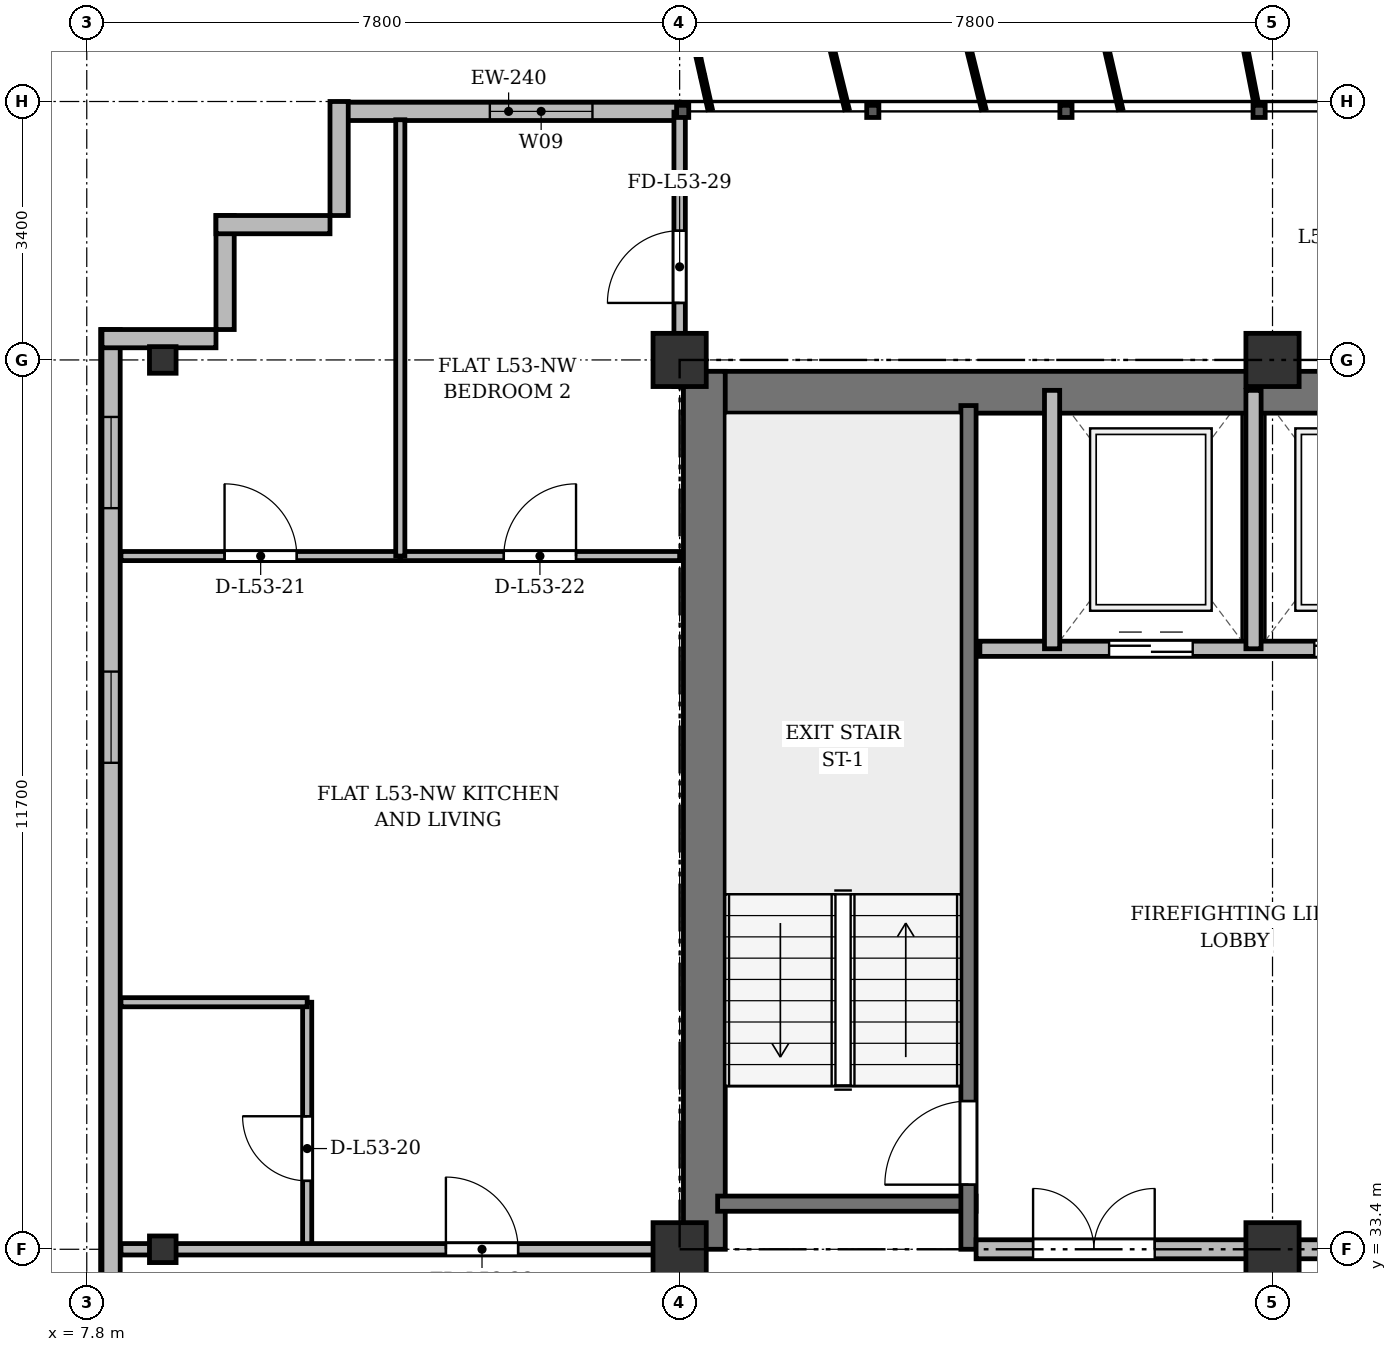
"""IFC4 building model, lengths in metres.
Left out: names, types, materials, properties, quantities, classifications, styles, units other than length and angle.
Written with IfcOpenShell. Run it as: python <this file> out.ifc"""

import sys

from ifc_helpers import new_model, si_unit, direction, frame, frame_2d, origin, origin_2d, place, context, subcontext, project, spatial, rectangle, i_section, extrude, source, transform, mapped, element, fill, save


model = new_model("IFC4")
c1 = context("Model", 3, precision=1e-05, world=origin(), true_north=direction((0.0, 1.0)))
c2 = subcontext(c1, "Body", "Model", "MODEL_VIEW")
j1 = project(units=[si_unit("LENGTHUNIT", "METRE"), si_unit("PLANEANGLEUNIT", "RADIAN")], contexts=[c1])
p1 = place(None, origin())
s1 = spatial("IfcSite", under=j1, at=p1, CompositionType="ELEMENT")
p2 = place(p1, origin())
s2 = spatial("IfcBuilding", under=s1, at=p2, CompositionType="ELEMENT")
p3 = place(p2, frame((0.0, 0.0, 204.9)))
s3 = spatial("IfcBuildingStorey", under=s2, at=p3, CompositionType="ELEMENT", Elevation=204.9)
m1 = source(origin(), c2, "Body", "SweptSolid", [
    extrude(i_section(OverallWidth=0.35, OverallDepth=0.35, WebThickness=0.018, FlangeThickness=0.028, at=origin_2d()), origin(), (0.0, 0.0, 1.0), 3.6),
])
for number, where, z_axis, x_axis in (
    (1, (8.8, 33.4, 0.0), (0.0, 0.0, 1.0), (1.0, 0.0, 0.0)),
    (2, (8.8, 45.1, 0.0), (0.0, 0.0, 1.0), (1.0, 0.0, 0.0)),
):
    element("IfcColumn", number, at=place(p3, frame(where, z_axis=z_axis, x_axis=x_axis)), inside=s3, PredefinedType="COLUMN", context=c2, shape_type="MappedRepresentation", body=[
        mapped(m1, transform((0.0, 0.0, 0.0), x_axis=(1.0, 0.0, 0.0), y_axis=(0.0, 1.0, 0.0), z_axis=(0.0, 0.0, 1.0), scale=1.0)),
    ])
m2 = source(origin(), c2, "Body", "SweptSolid", [
    extrude(rectangle(XDim=0.7, YDim=0.7, at=origin_2d()), origin(), (0.0, 0.0, 1.0), 3.6),
])
for number, where, z_axis, x_axis in (
    (3, (15.6, 33.4, 0.0), (0.0, 0.0, 1.0), (1.0, 0.0, 0.0)),
    (4, (15.6, 45.1, 0.0), (0.0, 0.0, 1.0), (1.0, 0.0, 0.0)),
    (5, (23.4, 33.4, 0.0), (0.0, 0.0, 1.0), (1.0, 0.0, 0.0)),
    (6, (23.4, 45.1, 0.0), (0.0, 0.0, 1.0), (1.0, 0.0, 0.0)),
):
    element("IfcColumn", number, at=place(p3, frame(where, z_axis=z_axis, x_axis=x_axis)), inside=s3, PredefinedType="COLUMN", context=c2, shape_type="MappedRepresentation", body=[
        mapped(m2, transform((0.0, 0.0, 0.0), x_axis=(1.0, 0.0, 0.0), y_axis=(0.0, 1.0, 0.0), z_axis=(0.0, 0.0, 1.0), scale=1.0)),
    ])
p4 = place(p3, frame((11.1, 48.37, 0.0), z_axis=(0.0, 0.0, 1.0), x_axis=(1.0, 0.0, 0.0)))
e7 = element("IfcWall", 7, at=p4, inside=s3, PredefinedType="SOLIDWALL", context=c2, shape_type="SweptSolid", body=[
    extrude(rectangle(XDim=4.5, YDim=0.24, at=frame_2d((2.25, 0.0))), origin(), (0.0, 0.0, 1.0), 3.36),
])
p5 = place(p4, frame((2.003, 0.0, 0.9)))
e8 = element("IfcOpeningElement", 8, at=p5, cuts=e7, PredefinedType="OPENING", context=c2, shape_type="SweptSolid", body=[
    extrude(rectangle(XDim=1.35, YDim=1.5, at=frame_2d((0.675, 0.75))), frame((0.0, 0.13, 0.0), z_axis=(0.0, -1.0, 0.0), x_axis=(1.0, 0.0, 0.0)), (0.0, 0.0, 1.0), 0.26),
])
p6 = place(p3, frame((8.12, 6.4, 0.0), z_axis=(0.0, 0.0, 1.0), x_axis=(0.0, 1.0, 0.0)))
e9 = element("IfcWall", 9, at=p6, inside=s3, PredefinedType="SOLIDWALL", context=c2, shape_type="SweptSolid", body=[
    extrude(rectangle(XDim=39.1, YDim=0.24, at=frame_2d((19.55, 0.0))), origin(), (0.0, 0.0, 1.0), 3.36),
])
p7 = place(p6, frame((1.45, 0.0, 0.92)))
e10 = element("IfcOpeningElement", 10, at=p7, cuts=e9, PredefinedType="OPENING", context=c2, shape_type="SweptSolid", body=[
    extrude(rectangle(XDim=1.2, YDim=1.65, at=frame_2d((0.6, 0.825))), frame((0.0, 0.13, 0.0), z_axis=(0.0, -1.0, 0.0), x_axis=(1.0, 0.0, 0.0)), (0.0, 0.0, 1.0), 0.26),
])
p8 = place(p6, frame((3.8, 0.0, 0.92)))
e11 = element("IfcOpeningElement", 11, at=p8, cuts=e9, PredefinedType="OPENING", context=c2, shape_type="SweptSolid", body=[
    extrude(rectangle(XDim=2.4, YDim=2.1, at=frame_2d((1.2, 1.05))), frame((0.0, 0.13, 0.0), z_axis=(0.0, -1.0, 0.0), x_axis=(1.0, 0.0, 0.0)), (0.0, 0.0, 1.0), 0.26),
])
p9 = place(p6, frame((8.0, 0.0, 0.92)))
e12 = element("IfcOpeningElement", 12, at=p9, cuts=e9, PredefinedType="OPENING", context=c2, shape_type="SweptSolid", body=[
    extrude(rectangle(XDim=2.4, YDim=2.1, at=frame_2d((1.2, 1.05))), frame((0.0, 0.13, 0.0), z_axis=(0.0, -1.0, 0.0), x_axis=(1.0, 0.0, 0.0)), (0.0, 0.0, 1.0), 0.26),
])
p10 = place(p6, frame((15.2, 0.0, 0.92)))
e13 = element("IfcOpeningElement", 13, at=p10, cuts=e9, PredefinedType="OPENING", context=c2, shape_type="SweptSolid", body=[
    extrude(rectangle(XDim=2.4, YDim=2.1, at=frame_2d((1.2, 1.05))), frame((0.0, 0.13, 0.0), z_axis=(0.0, -1.0, 0.0), x_axis=(1.0, 0.0, 0.0)), (0.0, 0.0, 1.0), 0.26),
])
p11 = place(p6, frame((33.4, 0.0, 0.92)))
e14 = element("IfcOpeningElement", 14, at=p11, cuts=e9, PredefinedType="OPENING", context=c2, shape_type="SweptSolid", body=[
    extrude(rectangle(XDim=1.2, YDim=1.65, at=frame_2d((0.6, 0.825))), frame((0.0, 0.13, 0.0), z_axis=(0.0, -1.0, 0.0), x_axis=(1.0, 0.0, 0.0)), (0.0, 0.0, 1.0), 0.26),
])
p12 = place(p6, frame((36.75, 0.0, 0.92)))
e15 = element("IfcOpeningElement", 15, at=p12, cuts=e9, PredefinedType="OPENING", context=c2, shape_type="SweptSolid", body=[
    extrude(rectangle(XDim=1.2, YDim=1.65, at=frame_2d((0.6, 0.825))), frame((0.0, 0.13, 0.0), z_axis=(0.0, -1.0, 0.0), x_axis=(1.0, 0.0, 0.0)), (0.0, 0.0, 1.0), 0.26),
])
for number, where, z_axis, x_axis in (
    (16, (8.0, 45.38, 0.0), (0.0, 0.0, 1.0), (1.0, 0.0, 0.0)),
    (17, (9.62, 45.5, 0.0), (0.0, 0.0, 1.0), (0.0, 1.0, 0.0)),
    (18, (9.5, 46.88, 0.0), (0.0, 0.0, 1.0), (1.0, 0.0, 0.0)),
    (19, (11.12, 47.0, 0.0), (0.0, 0.0, 1.0), (0.0, 1.0, 0.0)),
):
    element("IfcWall", number, at=place(p3, frame(where, z_axis=z_axis, x_axis=x_axis)), inside=s3, PredefinedType="SOLIDWALL", context=c2, shape_type="SweptSolid", body=[
        extrude(rectangle(XDim=1.5, YDim=0.24, at=frame_2d((0.75, 0.0))), origin(), (0.0, 0.0, 1.0), 3.36),
    ])
p13 = place(p3, frame((15.65, 44.675, 0.0), z_axis=(0.0, 0.0, 1.0), x_axis=(1.0, 0.0, 0.0)))
e20 = element("IfcWall", 20, at=p13, inside=s3, PredefinedType="SHEAR", context=c2, shape_type="SweptSolid", body=[
    extrude(rectangle(XDim=43.1, YDim=0.55, at=frame_2d((21.55, 0.0))), origin(), (0.0, 0.0, 1.0), 3.36),
])
p14 = place(p3, frame((15.925, 33.4, 0.0), z_axis=(0.0, 0.0, 1.0), x_axis=(0.0, 1.0, 0.0)))
e21 = element("IfcWall", 21, at=p14, inside=s3, PredefinedType="SHEAR", context=c2, shape_type="SweptSolid", body=[
    extrude(rectangle(XDim=11.55, YDim=0.55, at=frame_2d((5.775, 0.0))), origin(), (0.0, 0.0, 1.0), 3.36),
])
p15 = place(p3, frame((16.1, 34.0, 0.0), z_axis=(0.0, 0.0, 1.0), x_axis=(1.0, 0.0, 0.0)))
e22 = element("IfcWall", 22, at=p15, inside=s3, PredefinedType="SHEAR", context=c2, shape_type="SweptSolid", body=[
    extrude(rectangle(XDim=3.4, YDim=0.2, at=frame_2d((1.7, 0.0))), origin(), (0.0, 0.0, 1.0), 3.36),
])
p16 = place(p3, frame((19.4, 33.4, 0.0), z_axis=(0.0, 0.0, 1.0), x_axis=(0.0, 1.0, 0.0)))
e23 = element("IfcWall", 23, at=p16, inside=s3, PredefinedType="SHEAR", context=c2, shape_type="SweptSolid", body=[
    extrude(rectangle(XDim=11.1, YDim=0.2, at=frame_2d((5.55, 0.0))), origin(), (0.0, 0.0, 1.0), 3.36),
])
p17 = place(p16, frame((0.85, 0.0, 0.0)))
e24 = element("IfcOpeningElement", 24, at=p17, cuts=e23, PredefinedType="OPENING", context=c2, shape_type="SweptSolid", body=[
    extrude(rectangle(XDim=1.1, YDim=2.15, at=frame_2d((0.55, 1.075))), frame((0.0, 0.11, 0.0), z_axis=(0.0, -1.0, 0.0), x_axis=(1.0, 0.0, 0.0)), (0.0, 0.0, 1.0), 0.22),
])
p18 = place(p3, frame((19.55, 41.3, 0.0), z_axis=(0.0, 0.0, 1.0), x_axis=(1.0, 0.0, 0.0)))
e25 = element("IfcWall", 25, at=p18, inside=s3, PredefinedType="SOLIDWALL", context=c2, shape_type="SweptSolid", body=[
    extrude(rectangle(XDim=6.75, YDim=0.2, at=frame_2d((3.375, 0.0))), origin(), (0.0, 0.0, 1.0), 3.36),
])
p19 = place(p18, frame((1.7, 0.0, 0.0)))
e26 = element("IfcOpeningElement", 26, at=p19, cuts=e25, PredefinedType="OPENING", context=c2, shape_type="SweptSolid", body=[
    extrude(rectangle(XDim=1.1, YDim=2.15, at=frame_2d((0.55, 1.075))), frame((0.0, 0.11, 0.0), z_axis=(0.0, -1.0, 0.0), x_axis=(1.0, 0.0, 0.0)), (0.0, 0.0, 1.0), 0.22),
])
p20 = place(p18, frame((4.4, 0.0, 0.0)))
e27 = element("IfcOpeningElement", 27, at=p20, cuts=e25, PredefinedType="OPENING", context=c2, shape_type="SweptSolid", body=[
    extrude(rectangle(XDim=1.1, YDim=2.15, at=frame_2d((0.55, 1.075))), frame((0.0, 0.11, 0.0), z_axis=(0.0, -1.0, 0.0), x_axis=(1.0, 0.0, 0.0)), (0.0, 0.0, 1.0), 0.22),
])
for number, where, z_axis, x_axis in (
    (28, (20.5, 41.3, 0.0), (0.0, 0.0, 1.0), (0.0, 1.0, 0.0)),
    (29, (23.15, 41.3, 0.0), (0.0, 0.0, 1.0), (0.0, 1.0, 0.0)),
):
    element("IfcWall", number, at=place(p3, frame(where, z_axis=z_axis, x_axis=x_axis)), inside=s3, PredefinedType="SOLIDWALL", context=c2, shape_type="SweptSolid", body=[
        extrude(rectangle(XDim=3.4, YDim=0.2, at=frame_2d((1.7, 0.0))), origin(), (0.0, 0.0, 1.0), 3.36),
    ])
p21 = place(p3, frame((19.5, 33.4, 0.0), z_axis=(0.0, 0.0, 1.0), x_axis=(1.0, 0.0, 0.0)))
e30 = element("IfcWall", 30, at=p21, inside=s3, PredefinedType="PARTITIONING", context=c2, shape_type="SweptSolid", body=[
    extrude(rectangle(XDim=6.8, YDim=0.25, at=frame_2d((3.4, 0.0))), origin(), (0.0, 0.0, 1.0), 2.91),
])
p22 = place(p21, frame((0.75, 0.0, 0.0)))
e31 = element("IfcOpeningElement", 31, at=p22, cuts=e30, PredefinedType="OPENING", context=c2, shape_type="SweptSolid", body=[
    extrude(rectangle(XDim=1.6, YDim=2.2, at=frame_2d((0.8, 1.1))), frame((0.0, 0.135, 0.0), z_axis=(0.0, -1.0, 0.0), x_axis=(1.0, 0.0, 0.0)), (0.0, 0.0, 1.0), 0.27),
])
p23 = place(p3, frame((10.7, 33.4, 0.0), z_axis=(0.0, 0.0, 1.0), x_axis=(0.0, 1.0, 0.0)))
e32 = element("IfcWall", 32, at=p23, inside=s3, PredefinedType="PARTITIONING", context=c2, shape_type="SweptSolid", body=[
    extrude(rectangle(XDim=3.25, YDim=0.12, at=frame_2d((1.625, 0.0))), origin(), (0.0, 0.0, 1.0), 2.91),
])
p24 = place(p23, frame((0.9, 0.0, 0.0)))
e33 = element("IfcOpeningElement", 33, at=p24, cuts=e32, PredefinedType="OPENING", context=c2, shape_type="SweptSolid", body=[
    extrude(rectangle(XDim=0.85, YDim=2.1, at=frame_2d((0.425, 1.05))), frame((0.0, 0.07, 0.0), z_axis=(0.0, -1.0, 0.0), x_axis=(1.0, 0.0, 0.0)), (0.0, 0.0, 1.0), 0.14),
])
p25 = place(p3, frame((8.25, 36.65, 0.0), z_axis=(0.0, 0.0, 1.0), x_axis=(1.0, 0.0, 0.0)))
e34 = element("IfcWall", 34, at=p25, inside=s3, PredefinedType="PARTITIONING", context=c2, shape_type="SweptSolid", body=[
    extrude(rectangle(XDim=2.45, YDim=0.12, at=frame_2d((1.225, 0.0))), origin(), (0.0, 0.0, 1.0), 2.86),
])
p26 = place(p3, frame((8.25, 42.52, 0.0), z_axis=(0.0, 0.0, 1.0), x_axis=(1.0, 0.0, 0.0)))
e35 = element("IfcWall", 35, at=p26, inside=s3, PredefinedType="PARTITIONING", context=c2, shape_type="SweptSolid", body=[
    extrude(rectangle(XDim=3.675, YDim=0.12, at=frame_2d((1.837, 0.0))), origin(), (0.0, 0.0, 1.0), 2.86),
])
p27 = place(p26, frame((1.363, 0.0, 0.0)))
e36 = element("IfcOpeningElement", 36, at=p27, cuts=e35, PredefinedType="OPENING", context=c2, shape_type="SweptSolid", body=[
    extrude(rectangle(XDim=0.95, YDim=2.15, at=frame_2d((0.475, 1.075))), frame((0.0, 0.07, 0.0), z_axis=(0.0, -1.0, 0.0), x_axis=(1.0, 0.0, 0.0)), (0.0, 0.0, 1.0), 0.14),
])
p28 = place(p3, frame((11.925, 42.52, 0.0), z_axis=(0.0, 0.0, 1.0), x_axis=(1.0, 0.0, 0.0)))
e37 = element("IfcWall", 37, at=p28, inside=s3, PredefinedType="PARTITIONING", context=c2, shape_type="SweptSolid", body=[
    extrude(rectangle(XDim=3.675, YDim=0.12, at=frame_2d((1.837, 0.0))), origin(), (0.0, 0.0, 1.0), 2.86),
])
p29 = place(p28, frame((1.362, 0.0, 0.0)))
e38 = element("IfcOpeningElement", 38, at=p29, cuts=e37, PredefinedType="OPENING", context=c2, shape_type="SweptSolid", body=[
    extrude(rectangle(XDim=0.95, YDim=2.15, at=frame_2d((0.475, 1.075))), frame((0.0, 0.07, 0.0), z_axis=(0.0, -1.0, 0.0), x_axis=(1.0, 0.0, 0.0)), (0.0, 0.0, 1.0), 0.14),
])
p30 = place(p3, frame((11.925, 42.52, 0.0), z_axis=(0.0, 0.0, 1.0), x_axis=(0.0, 1.0, 0.0)))
e39 = element("IfcWall", 39, at=p30, inside=s3, PredefinedType="PARTITIONING", context=c2, shape_type="SweptSolid", body=[
    extrude(rectangle(XDim=5.74, YDim=0.12, at=frame_2d((2.87, 0.0))), origin(), (0.0, 0.0, 1.0), 2.91),
])
p31 = place(p3, frame((8.25, 33.4, 0.0), z_axis=(0.0, 0.0, 1.0), x_axis=(1.0, 0.0, 0.0)))
e40 = element("IfcWall", 40, at=p31, inside=s3, PredefinedType="PARTITIONING", context=c2, shape_type="SweptSolid", body=[
    extrude(rectangle(XDim=7.35, YDim=0.15, at=frame_2d((3.675, 0.0))), origin(), (0.0, 0.0, 1.0), 2.91),
])
p32 = place(p31, frame((4.275, 0.0, 0.0)))
e41 = element("IfcOpeningElement", 41, at=p32, cuts=e40, PredefinedType="OPENING", context=c2, shape_type="SweptSolid", body=[
    extrude(rectangle(XDim=0.95, YDim=2.15, at=frame_2d((0.475, 1.075))), frame((0.0, 0.085, 0.0), z_axis=(0.0, -1.0, 0.0), x_axis=(1.0, 0.0, 0.0)), (0.0, 0.0, 1.0), 0.17),
])
p33 = place(p3, frame((15.6, 44.75, 0.0), z_axis=(0.0, 0.0, 1.0), x_axis=(0.0, 1.0, 0.0)))
e42 = element("IfcWall", 42, at=p33, inside=s3, PredefinedType="PARTITIONING", context=c2, shape_type="SweptSolid", body=[
    extrude(rectangle(XDim=3.61, YDim=0.15, at=frame_2d((1.805, 0.0))), origin(), (0.0, 0.0, 1.0), 2.86),
])
p34 = place(p33, frame((1.1, 0.0, 0.0)))
e43 = element("IfcOpeningElement", 43, at=p34, cuts=e42, PredefinedType="OPENING", context=c2, shape_type="SweptSolid", body=[
    extrude(rectangle(XDim=0.95, YDim=2.15, at=frame_2d((0.475, 1.075))), frame((0.0, 0.085, 0.0), z_axis=(0.0, -1.0, 0.0), x_axis=(1.0, 0.0, 0.0)), (0.0, 0.0, 1.0), 0.17),
])
m3 = source(origin(), c2, "Body", "SweptSolid", [
    extrude(rectangle(XDim=1.35, YDim=1.5, at=frame_2d((0.675, 0.75))), frame((0.0, 0.03, 0.0), z_axis=(0.0, -1.0, 0.0), x_axis=(1.0, 0.0, 0.0)), (0.0, 0.0, 1.0), 0.06),
])
p35 = place(p5, origin())
e44 = element("IfcWindow", 44, at=p35, inside=s3, PartitioningType="SINGLE_PANEL", PredefinedType="WINDOW", context=c2, shape_type="MappedRepresentation", body=[
    mapped(m3, transform((0.0, 0.0, 0.0), x_axis=(1.0, 0.0, 0.0), y_axis=(0.0, 1.0, 0.0), z_axis=(0.0, 0.0, 1.0), scale=1.0)),
])
fill(e8, e44)
m4 = source(origin(), c2, "Body", "SweptSolid", [
    extrude(rectangle(XDim=1.2, YDim=1.65, at=frame_2d((0.6, 0.825))), frame((0.0, 0.03, 0.0), z_axis=(0.0, -1.0, 0.0), x_axis=(1.0, 0.0, 0.0)), (0.0, 0.0, 1.0), 0.06),
])
p36 = place(p11, origin())
e45 = element("IfcWindow", 45, at=p36, inside=s3, PartitioningType="SINGLE_PANEL", PredefinedType="WINDOW", context=c2, shape_type="MappedRepresentation", body=[
    mapped(m4, transform((0.0, 0.0, 0.0), x_axis=(1.0, 0.0, 0.0), y_axis=(0.0, 1.0, 0.0), z_axis=(0.0, 0.0, 1.0), scale=1.0)),
])
fill(e14, e45)
p37 = place(p12, origin())
e46 = element("IfcWindow", 46, at=p37, inside=s3, PartitioningType="SINGLE_PANEL", PredefinedType="WINDOW", context=c2, shape_type="MappedRepresentation", body=[
    mapped(m4, transform((0.0, 0.0, 0.0), x_axis=(1.0, 0.0, 0.0), y_axis=(0.0, 1.0, 0.0), z_axis=(0.0, 0.0, 1.0), scale=1.0)),
])
fill(e15, e46)
m5 = source(origin(), c2, "Body", "SweptSolid", [
    extrude(rectangle(XDim=1.1, YDim=2.15, at=frame_2d((0.55, 1.075))), frame((0.0, 0.025, 0.0), z_axis=(0.0, -1.0, 0.0), x_axis=(1.0, 0.0, 0.0)), (0.0, 0.0, 1.0), 0.05),
])
p38 = place(p17, origin())
e47 = element("IfcDoor", 47, at=p38, inside=s3, OperationType="SINGLE_SWING_LEFT", PredefinedType="DOOR", context=c2, shape_type="MappedRepresentation", body=[
    mapped(m5, transform((0.0, 0.0, 0.0), x_axis=(1.0, 0.0, 0.0), y_axis=(0.0, 1.0, 0.0), z_axis=(0.0, 0.0, 1.0), scale=1.0)),
])
fill(e24, e47)
p39 = place(p19, origin())
e48 = element("IfcDoor", 48, at=p39, inside=s3, OperationType="DOUBLE_DOOR_SLIDING", PredefinedType="DOOR", context=c2, shape_type="MappedRepresentation", body=[
    mapped(m5, transform((0.0, 0.0, 0.0), x_axis=(1.0, 0.0, 0.0), y_axis=(0.0, 1.0, 0.0), z_axis=(0.0, 0.0, 1.0), scale=1.0)),
])
fill(e26, e48)
p40 = place(p20, origin())
e49 = element("IfcDoor", 49, at=p40, inside=s3, OperationType="DOUBLE_DOOR_SLIDING", PredefinedType="DOOR", context=c2, shape_type="MappedRepresentation", body=[
    mapped(m5, transform((0.0, 0.0, 0.0), x_axis=(1.0, 0.0, 0.0), y_axis=(0.0, 1.0, 0.0), z_axis=(0.0, 0.0, 1.0), scale=1.0)),
])
fill(e27, e49)
m6 = source(origin(), c2, "Body", "SweptSolid", [
    extrude(rectangle(XDim=1.6, YDim=2.2, at=frame_2d((0.8, 1.1))), frame((0.0, 0.025, 0.0), z_axis=(0.0, -1.0, 0.0), x_axis=(1.0, 0.0, 0.0)), (0.0, 0.0, 1.0), 0.05),
])
p41 = place(p22, origin())
e50 = element("IfcDoor", 50, at=p41, inside=s3, OperationType="DOUBLE_DOOR_SINGLE_SWING", PredefinedType="DOOR", context=c2, shape_type="MappedRepresentation", body=[
    mapped(m6, transform((0.0, 0.0, 0.0), x_axis=(1.0, 0.0, 0.0), y_axis=(0.0, 1.0, 0.0), z_axis=(0.0, 0.0, 1.0), scale=1.0)),
])
fill(e31, e50)
m7 = source(origin(), c2, "Body", "SweptSolid", [
    extrude(rectangle(XDim=0.85, YDim=2.1, at=frame_2d((0.425, 1.05))), frame((0.0, 0.025, 0.0), z_axis=(0.0, -1.0, 0.0), x_axis=(1.0, 0.0, 0.0)), (0.0, 0.0, 1.0), 0.05),
])
p42 = place(p24, origin())
e51 = element("IfcDoor", 51, at=p42, inside=s3, OperationType="SINGLE_SWING_RIGHT", PredefinedType="DOOR", context=c2, shape_type="MappedRepresentation", body=[
    mapped(m7, transform((0.0, 0.0, 0.0), x_axis=(1.0, 0.0, 0.0), y_axis=(0.0, 1.0, 0.0), z_axis=(0.0, 0.0, 1.0), scale=1.0)),
])
fill(e33, e51)
m8 = source(origin(), c2, "Body", "SweptSolid", [
    extrude(rectangle(XDim=0.95, YDim=2.15, at=frame_2d((0.475, 1.075))), frame((0.0, 0.025, 0.0), z_axis=(0.0, -1.0, 0.0), x_axis=(1.0, 0.0, 0.0)), (0.0, 0.0, 1.0), 0.05),
])
p43 = place(p27, origin())
e52 = element("IfcDoor", 52, at=p43, inside=s3, OperationType="SINGLE_SWING_LEFT", PredefinedType="DOOR", context=c2, shape_type="MappedRepresentation", body=[
    mapped(m8, transform((0.0, 0.0, 0.0), x_axis=(1.0, 0.0, 0.0), y_axis=(0.0, 1.0, 0.0), z_axis=(0.0, 0.0, 1.0), scale=1.0)),
])
fill(e36, e52)
p44 = place(p29, origin())
e53 = element("IfcDoor", 53, at=p44, inside=s3, OperationType="SINGLE_SWING_RIGHT", PredefinedType="DOOR", context=c2, shape_type="MappedRepresentation", body=[
    mapped(m8, transform((0.0, 0.0, 0.0), x_axis=(1.0, 0.0, 0.0), y_axis=(0.0, 1.0, 0.0), z_axis=(0.0, 0.0, 1.0), scale=1.0)),
])
fill(e38, e53)
p45 = place(p32, origin())
e54 = element("IfcDoor", 54, at=p45, inside=s3, OperationType="SINGLE_SWING_LEFT", PredefinedType="DOOR", context=c2, shape_type="MappedRepresentation", body=[
    mapped(m8, transform((0.0, 0.0, 0.0), x_axis=(1.0, 0.0, 0.0), y_axis=(0.0, 1.0, 0.0), z_axis=(0.0, 0.0, 1.0), scale=1.0)),
])
fill(e41, e54)
p46 = place(p34, origin())
e55 = element("IfcDoor", 55, at=p46, inside=s3, OperationType="SINGLE_SWING_LEFT", PredefinedType="DOOR", context=c2, shape_type="MappedRepresentation", body=[
    mapped(m8, transform((0.0, 0.0, 0.0), x_axis=(1.0, 0.0, 0.0), y_axis=(0.0, 1.0, 0.0), z_axis=(0.0, 0.0, 1.0), scale=1.0)),
])
fill(e43, e55)
save(model, sys.argv[1])
